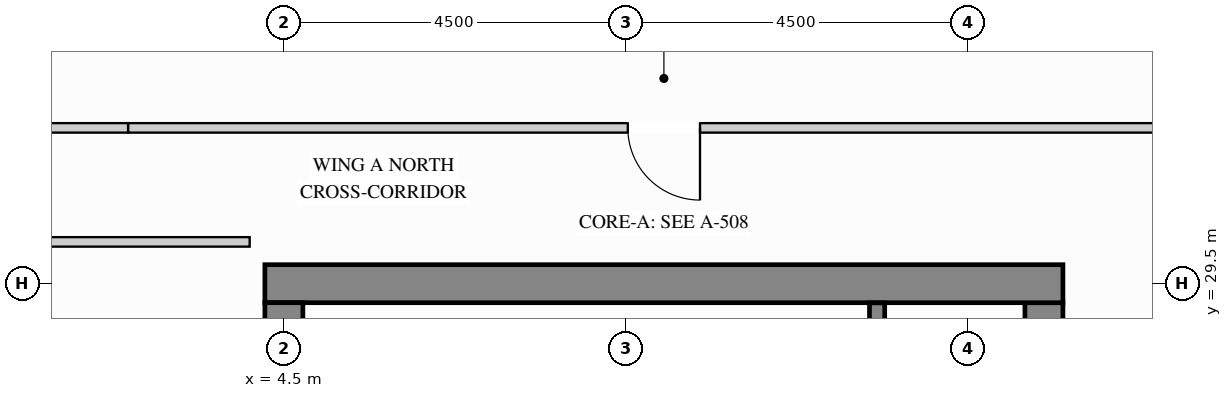
"""IFC4 building model, lengths in metres.
Left out: names, types, materials, properties, quantities, classifications, styles, units other than length and angle.
Written with IfcOpenShell. Run it as: python <this file> out.ifc"""

import sys

from ifc_helpers import new_model, si_unit, direction, frame, frame_2d, origin, place, context, subcontext, project, spatial, rectangle, extrude, source, transform, mapped, element, fill, save


model = new_model("IFC4")
c1 = context("Model", 3, precision=1e-05, world=origin(), true_north=direction((0.0, 1.0)))
c2 = subcontext(c1, "Body", "Model", "MODEL_VIEW")
j1 = project(units=[si_unit("LENGTHUNIT", "METRE"), si_unit("PLANEANGLEUNIT", "RADIAN")], contexts=[c1])
p1 = place(None, origin())
s1 = spatial("IfcSite", under=j1, at=p1, CompositionType="ELEMENT")
p2 = place(p1, origin())
s2 = spatial("IfcBuilding", under=s1, at=p2, CompositionType="ELEMENT")
p3 = place(p2, frame((0.0, 0.0, 234.0)))
s3 = spatial("IfcBuildingStorey", under=s2, at=p3, CompositionType="ELEMENT", Elevation=234.0)
m1 = source(origin(), c2, "Body", "SweptSolid", [
    extrude(rectangle(XDim=8.37, YDim=0.5, at=frame_2d((4.185, 0.0))), origin(), (0.0, 0.0, 1.0), 3.4),
])
p4 = place(p3, frame((14.5, 20.88, 0.0), z_axis=(0.0, 0.0, 1.0), x_axis=(0.0, 1.0, 0.0)))
e1 = element("IfcWall", 1, at=p4, inside=s3, PredefinedType="SHEAR", context=c2, shape_type="MappedRepresentation", body=[
    mapped(m1, transform((0.0, 0.0, 0.0), x_axis=(1.0, 0.0, 0.0), y_axis=(0.0, 1.0, 0.0), z_axis=(0.0, 0.0, 1.0))),
])
m2 = source(origin(), c2, "Body", "SweptSolid", [
    extrude(rectangle(XDim=10.5, YDim=0.5, at=frame_2d((5.25, 0.0))), origin(), (0.0, 0.0, 1.0), 3.4),
])
p5 = place(p3, frame((4.25, 29.5, 0.0), z_axis=(0.0, 0.0, 1.0), x_axis=(1.0, 0.0, 0.0)))
e2 = element("IfcWall", 2, at=p5, inside=s3, PredefinedType="SHEAR", context=c2, shape_type="MappedRepresentation", body=[
    mapped(m2, transform((0.0, 0.0, 0.0), x_axis=(1.0, 0.0, 0.0), y_axis=(0.0, 1.0, 0.0), z_axis=(0.0, 0.0, 1.0))),
])
m3 = source(origin(), c2, "Body", "SweptSolid", [
    extrude(rectangle(XDim=20.5, YDim=0.5, at=frame_2d((10.25, 0.0))), origin(), (0.0, 0.0, 1.0), 3.4),
])
p6 = place(p3, frame((4.5, 8.75, 0.0), z_axis=(0.0, 0.0, 1.0), x_axis=(0.0, 1.0, 0.0)))
e3 = element("IfcWall", 3, at=p6, inside=s3, PredefinedType="SHEAR", context=c2, shape_type="MappedRepresentation", body=[
    mapped(m3, transform((0.0, 0.0, 0.0), x_axis=(1.0, 0.0, 0.0), y_axis=(0.0, 1.0, 0.0), z_axis=(0.0, 0.0, 1.0))),
])
p7 = place(p3, frame((2.45, 31.55, 0.0), z_axis=(0.0, 0.0, 1.0), x_axis=(1.0, 0.0, 0.0)))
e4 = element("IfcWall", 4, at=p7, inside=s3, PredefinedType="PARTITIONING", context=c2, shape_type="SweptSolid", body=[
    extrude(rectangle(XDim=14.1, YDim=0.125, at=frame_2d((7.05, 0.0))), origin(), (0.0, 0.0, 1.0), 3.385),
])
p8 = place(p7, frame((6.575, 0.0, 0.0)))
e5 = element("IfcOpeningElement", 5, at=p8, cuts=e4, PredefinedType="OPENING", context=c2, shape_type="SweptSolid", body=[
    extrude(rectangle(XDim=0.95, YDim=2.15, at=frame_2d((0.475, 1.075))), frame((0.0, 0.073, 0.0), z_axis=(0.0, -1.0, 0.0), x_axis=(1.0, 0.0, 0.0)), (0.0, 0.0, 1.0), 0.145),
])
m4 = source(origin(), c2, "Body", "SweptSolid", [
    extrude(rectangle(XDim=2.098, YDim=0.125, at=frame_2d((1.049, 0.0))), origin(), (0.0, 0.0, 1.0), 3.385),
])
p9 = place(p3, frame((0.352, 31.55, 0.0), z_axis=(0.0, 0.0, 1.0), x_axis=(1.0, 0.0, 0.0)))
e6 = element("IfcWall", 6, at=p9, inside=s3, PredefinedType="PARTITIONING", context=c2, shape_type="MappedRepresentation", body=[
    mapped(m4, transform((0.0, 0.0, 0.0), x_axis=(1.0, 0.0, 0.0), y_axis=(0.0, 1.0, 0.0), z_axis=(0.0, 0.0, 1.0))),
])
m5 = source(origin(), c2, "Body", "SweptSolid", [
    extrude(rectangle(XDim=3.0, YDim=0.125, at=frame_2d((1.5, 0.0))), origin(), (0.0, 0.0, 1.0), 3.385),
])
p10 = place(p3, frame((1.05, 30.05, 0.0), z_axis=(0.0, 0.0, 1.0), x_axis=(1.0, 0.0, 0.0)))
e7 = element("IfcWall", 7, at=p10, inside=s3, PredefinedType="PARTITIONING", context=c2, shape_type="MappedRepresentation", body=[
    mapped(m5, transform((0.0, 0.0, 0.0), x_axis=(1.0, 0.0, 0.0), y_axis=(0.0, 1.0, 0.0), z_axis=(0.0, 0.0, 1.0))),
])
m6 = source(origin(), c2, "Body", "SweptSolid", [
    extrude(rectangle(XDim=3.803, YDim=0.2, at=frame_2d((1.901, 0.0))), origin(), (0.0, 0.0, 1.0), 3.4),
])
p11 = place(p3, frame((12.305, 25.445, 0.0), z_axis=(0.0, 0.0, 1.0), x_axis=(0.0, 1.0, 0.0)))
e8 = element("IfcWall", 8, at=p11, inside=s3, PredefinedType="SHEAR", context=c2, shape_type="MappedRepresentation", body=[
    mapped(m6, transform((0.0, 0.0, 0.0), x_axis=(1.0, 0.0, 0.0), y_axis=(0.0, 1.0, 0.0), z_axis=(0.0, 0.0, 1.0))),
])
m7 = source(origin(), c2, "Body", "SweptSolid", [
    extrude(rectangle(XDim=0.95, YDim=2.15, at=frame_2d((0.475, 1.075))), frame((0.0, 0.025, 0.0), z_axis=(0.0, -1.0, 0.0), x_axis=(1.0, 0.0, 0.0)), (0.0, 0.0, 1.0), 0.05),
])
p12 = place(p8, origin())
e9 = element("IfcDoor", 9, at=p12, inside=s3, OperationType="SINGLE_SWING_RIGHT", PredefinedType="DOOR", context=c2, shape_type="MappedRepresentation", body=[
    mapped(m7, transform((0.0, 0.0, 0.0), x_axis=(1.0, 0.0, 0.0), y_axis=(0.0, 1.0, 0.0), z_axis=(0.0, 0.0, 1.0))),
])
fill(e5, e9)
save(model, sys.argv[1])
